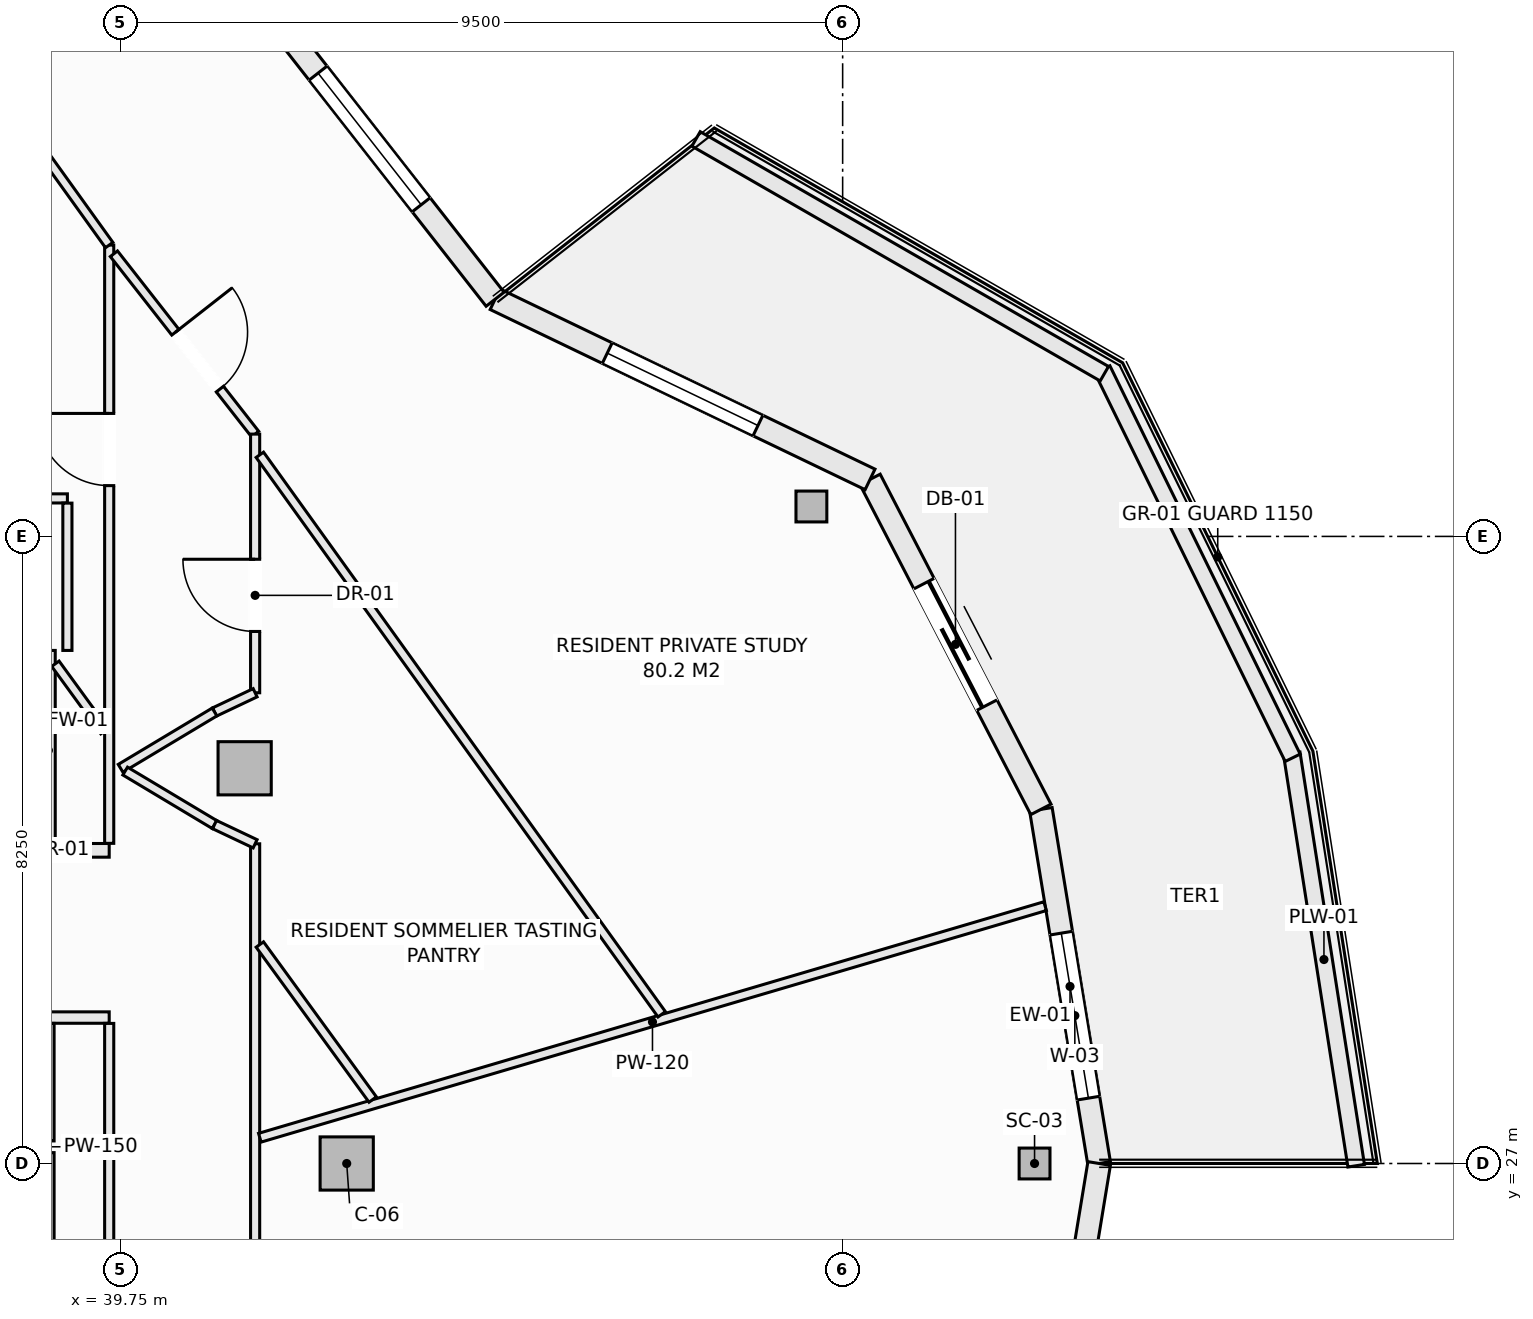
"""IFC4 building model, lengths in metres.
Left out: names, types, materials, properties, quantities, classifications, styles, units other than length and angle.
Written with IfcOpenShell. Run it as: python <this file> out.ifc"""

import sys

from ifc_helpers import new_model, si_unit, direction, frame, frame_2d, origin, origin_2d, place, context, subcontext, project, spatial, rectangle, hollow_rectangle, extrude, element, fill, save


model = new_model("IFC4")
c1 = context("Model", 3, precision=1e-05, world=origin(), true_north=direction((0.0, 1.0)))
c2 = subcontext(c1, "Body", "Model", "MODEL_VIEW")
j1 = project(units=[si_unit("LENGTHUNIT", "METRE"), si_unit("PLANEANGLEUNIT", "RADIAN")], contexts=[c1])
p1 = place(None, origin())
s1 = spatial("IfcSite", under=j1, at=p1, CompositionType="ELEMENT")
p2 = place(p1, origin())
s2 = spatial("IfcBuilding", under=s1, at=p2, CompositionType="ELEMENT")
p3 = place(p2, frame((0.0, 0.0, 242.6)))
s3 = spatial("IfcBuildingStorey", under=s2, at=p3, CompositionType="ELEMENT", Elevation=242.6)
for number, where, z_axis, x_axis in (
    (1, (51.775, 27.0, -0.27), (0.0, 0.0, 1.0), (1.0, 0.0, 0.0)),
    (2, (48.839, 35.644, -0.27), (0.0, 0.0, 1.0), (1.0, 0.0, 0.0)),
):
    element("IfcColumn", number, at=place(p3, frame(where, z_axis=z_axis, x_axis=x_axis)), inside=s3, PredefinedType="COLUMN", context=c2, shape_type="SweptSolid", body=[
        extrude(hollow_rectangle(XDim=0.406, YDim=0.406, WallThickness=0.016, at=origin_2d()), origin(), (0.0, 0.0, 1.0), 3.3),
    ])
for number, where, z_axis, x_axis in (
    (3, (42.725, 27.0, -0.27), (0.0, 0.0, 1.0), (1.0, 0.0, 0.0)),
    (4, (41.382, 32.199, -0.27), (0.0, 0.0, 1.0), (1.0, 0.0, 0.0)),
):
    element("IfcColumn", number, at=place(p3, frame(where, z_axis=z_axis, x_axis=x_axis)), inside=s3, PredefinedType="COLUMN", context=c2, shape_type="SweptSolid", body=[
        extrude(rectangle(XDim=0.7, YDim=0.7, at=origin_2d()), origin(), (0.0, 0.0, 1.0), 3.3),
    ])
p4 = place(p3, frame((51.858, 31.659, 0.0), z_axis=(0.0, 0.0, 1.0), x_axis=(0.162369371657, -0.986730047758, 0.0)))
e5 = element("IfcWall", 5, at=p4, inside=s3, PredefinedType="SOLIDWALL", context=c2, shape_type="SweptSolid", body=[
    extrude(rectangle(XDim=4.721, YDim=0.3, at=frame_2d((2.361, 0.0))), origin(), (0.0, 0.0, 1.0), 2.605),
])
p5 = place(p4, frame((1.65, 0.0, 0.72)))
e6 = element("IfcOpeningElement", 6, at=p5, cuts=e5, PredefinedType="OPENING", context=c2, shape_type="SweptSolid", body=[
    extrude(rectangle(XDim=2.2, YDim=1.65, at=frame_2d((1.1, 0.825))), frame((0.0, 0.16, 0.0), z_axis=(0.0, -1.0, 0.0), x_axis=(1.0, 0.0, 0.0)), (0.0, 0.0, 1.0), 0.32),
])
p6 = place(p3, frame((49.611, 36.0, 0.0), z_axis=(0.0, 0.0, 1.0), x_axis=(0.459793771602, -0.888025724625, 0.0)))
e7 = element("IfcWall", 7, at=p6, inside=s3, PredefinedType="SOLIDWALL", context=c2, shape_type="SweptSolid", body=[
    extrude(rectangle(XDim=4.889, YDim=0.3, at=frame_2d((2.444, 0.0))), origin(), (0.0, 0.0, 1.0), 2.605),
])
p7 = place(p6, frame((1.544, 0.0, 0.0)))
e8 = element("IfcOpeningElement", 8, at=p7, cuts=e7, PredefinedType="OPENING", context=c2, shape_type="SweptSolid", body=[
    extrude(rectangle(XDim=1.8, YDim=2.25, at=frame_2d((0.9, 1.125))), frame((0.0, 0.16, 0.0), z_axis=(0.0, -1.0, 0.0), x_axis=(1.0, 0.0, 0.0)), (0.0, 0.0, 1.0), 0.32),
])
p8 = place(p3, frame((44.677, 38.37, 0.0), z_axis=(0.0, 0.0, 1.0), x_axis=(0.901355238351, -0.433080517106, 0.0)))
e9 = element("IfcWall", 9, at=p8, inside=s3, PredefinedType="SOLIDWALL", context=c2, shape_type="SweptSolid", body=[
    extrude(rectangle(XDim=5.473, YDim=0.3, at=frame_2d((2.737, 0.0))), origin(), (0.0, 0.0, 1.0), 2.605),
])
p9 = place(p8, frame((1.637, 0.0, 0.72)))
e10 = element("IfcOpeningElement", 10, at=p9, cuts=e9, PredefinedType="OPENING", context=c2, shape_type="SweptSolid", body=[
    extrude(rectangle(XDim=2.2, YDim=1.65, at=frame_2d((1.1, 0.825))), frame((0.0, 0.16, 0.0), z_axis=(0.0, -1.0, 0.0), x_axis=(1.0, 0.0, 0.0)), (0.0, 0.0, 1.0), 0.32),
])
p10 = place(p3, frame((41.375, 42.588, 0.0), z_axis=(0.0, 0.0, 1.0), x_axis=(0.61644588519, -0.787397276241, 0.0)))
e11 = element("IfcWall", 11, at=p10, inside=s3, PredefinedType="SOLIDWALL", context=c2, shape_type="SweptSolid", body=[
    extrude(rectangle(XDim=5.357, YDim=0.3, at=frame_2d((2.678, 0.0))), origin(), (0.0, 0.0, 1.0), 2.605),
])
p11 = place(p10, frame((1.579, 0.0, 0.72)))
e12 = element("IfcOpeningElement", 12, at=p11, cuts=e11, PredefinedType="OPENING", context=c2, shape_type="SweptSolid", body=[
    extrude(rectangle(XDim=2.2, YDim=1.65, at=frame_2d((1.1, 0.825))), frame((0.0, 0.16, 0.0), z_axis=(0.0, -1.0, 0.0), x_axis=(1.0, 0.0, 0.0)), (0.0, 0.0, 1.0), 0.32),
])
p12 = place(p3, frame((51.858, 22.341, 0.0), z_axis=(0.0, 0.0, 1.0), x_axis=(0.162369371657, 0.986730047758, 0.0)))
e13 = element("IfcWall", 13, at=p12, inside=s3, PredefinedType="SOLIDWALL", context=c2, shape_type="SweptSolid", body=[
    extrude(rectangle(XDim=4.721, YDim=0.3, at=frame_2d((2.361, 0.0))), origin(), (0.0, 0.0, 1.0), 2.605),
])
p13 = place(p12, frame((1.261, 0.0, 0.72)))
e14 = element("IfcOpeningElement", 14, at=p13, cuts=e13, PredefinedType="OPENING", context=c2, shape_type="SweptSolid", body=[
    extrude(rectangle(XDim=2.2, YDim=1.65, at=frame_2d((1.1, 0.825))), frame((0.0, 0.16, 0.0), z_axis=(0.0, -1.0, 0.0), x_axis=(1.0, 0.0, 0.0)), (0.0, 0.0, 1.0), 0.32),
])
p14 = place(p3, frame((55.158, 32.396, 0.0), z_axis=(0.0, 0.0, 1.0), x_axis=(0.154441975483, -0.988001860428, 0.0)))
e15 = element("IfcWall", 15, at=p14, inside=s3, PredefinedType="PARAPET", context=c2, shape_type="SweptSolid", body=[
    extrude(rectangle(XDim=5.492, YDim=0.22, at=frame_2d((2.746, 0.0))), origin(), (0.0, 0.0, 1.0), 0.52),
])
p15 = place(p3, frame((52.667, 37.447, 0.0), z_axis=(0.0, 0.0, 1.0), x_axis=(0.440058847499, -0.897968936399, 0.0)))
e16 = element("IfcWall", 16, at=p15, inside=s3, PredefinedType="PARAPET", context=c2, shape_type="SweptSolid", body=[
    extrude(rectangle(XDim=5.689, YDim=0.22, at=frame_2d((2.845, 0.0))), origin(), (0.0, 0.0, 1.0), 0.52),
])
p16 = place(p3, frame((47.321, 40.479, 0.0), z_axis=(0.0, 0.0, 1.0), x_axis=(0.866901621005, -0.49847926687, 0.0)))
e17 = element("IfcWall", 17, at=p16, inside=s3, PredefinedType="PARAPET", context=c2, shape_type="SweptSolid", body=[
    extrude(rectangle(XDim=6.197, YDim=0.22, at=frame_2d((3.098, 0.0))), origin(), (0.0, 0.0, 1.0), 0.52),
])
p17 = place(p3, frame((30.077, 28.92, 0.0), z_axis=(0.0, 0.0, 1.0), x_axis=(1.0, 0.0, 0.0)))
e18 = element("IfcWall", 18, at=p17, inside=s3, PredefinedType="PARTITIONING", context=c2, shape_type="SweptSolid", body=[
    extrude(rectangle(XDim=9.523, YDim=0.15, at=frame_2d((4.762, 0.0))), origin(), (0.0, 0.0, 1.0), 3.03),
])
p18 = place(p17, frame((1.342, 0.0, 0.0)))
e19 = element("IfcOpeningElement", 19, at=p18, cuts=e18, PredefinedType="OPENING", context=c2, shape_type="SweptSolid", body=[
    extrude(rectangle(XDim=0.95, YDim=2.1, at=frame_2d((0.475, 1.05))), frame((0.0, 0.085, 0.0), z_axis=(0.0, -1.0, 0.0), x_axis=(1.0, 0.0, 0.0)), (0.0, 0.0, 1.0), 0.17),
])
p19 = place(p17, frame((5.498, 0.0, 0.0)))
e20 = element("IfcOpeningElement", 20, at=p19, cuts=e18, PredefinedType="OPENING", context=c2, shape_type="SweptSolid", body=[
    extrude(rectangle(XDim=0.95, YDim=2.1, at=frame_2d((0.475, 1.05))), frame((0.0, 0.085, 0.0), z_axis=(0.0, -1.0, 0.0), x_axis=(1.0, 0.0, 0.0)), (0.0, 0.0, 1.0), 0.17),
])
p20 = place(p3, frame((38.8, 25.197, 0.0), z_axis=(0.0, 0.0, 1.0), x_axis=(0.0, 1.0, 0.0)))
e21 = element("IfcWall", 21, at=p20, inside=s3, PredefinedType="PARTITIONING", context=c2, shape_type="SweptSolid", body=[
    extrude(rectangle(XDim=1.946, YDim=0.15, at=frame_2d((0.973, 0.0))), origin(), (0.0, 0.0, 1.0), 3.03),
])
p21 = place(p3, frame((38.8, 27.297, 0.0), z_axis=(0.0, 0.0, 1.0), x_axis=(0.0, 1.0, 0.0)))
e22 = element("IfcWall", 22, at=p21, inside=s3, PredefinedType="PARTITIONING", context=c2, shape_type="SweptSolid", body=[
    extrude(rectangle(XDim=1.546, YDim=0.15, at=frame_2d((0.773, 0.0))), origin(), (0.0, 0.0, 1.0), 3.03),
])
p22 = place(p3, frame((38.8, 31.12, 0.0), z_axis=(0.0, 0.0, 1.0), x_axis=(0.0, 1.0, 0.0)))
e23 = element("IfcWall", 23, at=p22, inside=s3, PredefinedType="SOLIDWALL", context=c2, shape_type="SweptSolid", body=[
    extrude(rectangle(XDim=2.63, YDim=0.18, at=frame_2d((1.315, 0.0))), origin(), (0.0, 0.0, 1.0), 3.03),
])
p23 = place(p3, frame((38.892, 31.12, 0.0), z_axis=(0.0, 0.0, 1.0), x_axis=(1.0, 0.0, 0.0)))
e24 = element("IfcWall", 24, at=p23, inside=s3, PredefinedType="SOLIDWALL", context=c2, shape_type="SweptSolid", body=[
    extrude(rectangle(XDim=0.708, YDim=0.18, at=frame_2d((0.354, 0.0))), origin(), (0.0, 0.0, 1.0), 3.03),
])
p24 = place(p3, frame((33.913, 35.75, 0.0), z_axis=(0.0, 0.0, 1.0), x_axis=(1.0, 0.0, 0.0)))
e25 = element("IfcWall", 25, at=p24, inside=s3, PredefinedType="PARTITIONING", context=c2, shape_type="SweptSolid", body=[
    extrude(rectangle(XDim=5.137, YDim=0.12, at=frame_2d((2.568, 0.0))), origin(), (0.0, 0.0, 1.0), 2.478),
])
p25 = place(p3, frame((39.05, 33.75, 0.0), z_axis=(0.0, 0.0, 1.0), x_axis=(0.0, 1.0, 0.0)))
e26 = element("IfcWall", 26, at=p25, inside=s3, PredefinedType="PARTITIONING", context=c2, shape_type="SweptSolid", body=[
    extrude(rectangle(XDim=1.938, YDim=0.12, at=frame_2d((0.969, 0.0))), origin(), (0.0, 0.0, 1.0), 3.03),
])
p26 = place(p3, frame((39.6, 25.197, 0.0), z_axis=(0.0, 0.0, 1.0), x_axis=(0.0, 1.0, 0.0)))
e27 = element("IfcWall", 27, at=p26, inside=s3, PredefinedType="PARTITIONING", context=c2, shape_type="SweptSolid", body=[
    extrude(rectangle(XDim=3.646, YDim=0.12, at=frame_2d((1.823, 0.0))), origin(), (0.0, 0.0, 1.0), 3.03),
])
p27 = place(p3, frame((39.6, 31.212, 0.0), z_axis=(0.0, 0.0, 1.0), x_axis=(0.0, 1.0, 0.0)))
e28 = element("IfcWall", 28, at=p27, inside=s3, PredefinedType="PARTITIONING", context=c2, shape_type="SweptSolid", body=[
    extrude(rectangle(XDim=7.871, YDim=0.12, at=frame_2d((3.936, 0.0))), origin(), (0.0, 0.0, 1.0), 3.03),
])
p28 = place(p27, frame((4.706, 0.0, 0.0)))
e29 = element("IfcOpeningElement", 29, at=p28, cuts=e28, PredefinedType="OPENING", context=c2, shape_type="SweptSolid", body=[
    extrude(rectangle(XDim=0.95, YDim=2.1, at=frame_2d((0.475, 1.05))), frame((0.0, 0.07, 0.0), z_axis=(0.0, -1.0, 0.0), x_axis=(1.0, 0.0, 0.0)), (0.0, 0.0, 1.0), 0.14),
])
p29 = place(p3, frame((39.662, 38.969, 0.0), z_axis=(0.0, 0.0, 1.0), x_axis=(0.616500468458, -0.787354540465, 0.0)))
e30 = element("IfcWall", 30, at=p29, inside=s3, PredefinedType="PARTITIONING", context=c2, shape_type="SweptSolid", body=[
    extrude(rectangle(XDim=3.014, YDim=0.12, at=frame_2d((1.507, 0.0))), origin(), (0.0, 0.0, 1.0), 3.03),
])
p30 = place(p29, frame((1.312, 0.0, 0.0)))
e31 = element("IfcOpeningElement", 31, at=p30, cuts=e30, PredefinedType="OPENING", context=c2, shape_type="SweptSolid", body=[
    extrude(rectangle(XDim=0.95, YDim=2.1, at=frame_2d((0.475, 1.05))), frame((0.0, 0.07, 0.0), z_axis=(0.0, -1.0, 0.0), x_axis=(1.0, 0.0, 0.0)), (0.0, 0.0, 1.0), 0.14),
])
p31 = place(p3, frame((41.52, 22.794, 0.0), z_axis=(0.0, 0.0, 1.0), x_axis=(0.0, 1.0, 0.0)))
e32 = element("IfcWall", 32, at=p31, inside=s3, PredefinedType="PARTITIONING", context=c2, shape_type="SweptSolid", body=[
    extrude(rectangle(XDim=8.412, YDim=0.12, at=frame_2d((4.206, 0.0))), origin(), (0.0, 0.0, 1.0), 2.478),
])
p32 = place(p31, frame((1.999, 0.0, 0.0)))
e33 = element("IfcOpeningElement", 33, at=p32, cuts=e32, PredefinedType="OPENING", context=c2, shape_type="SweptSolid", body=[
    extrude(rectangle(XDim=0.95, YDim=2.1, at=frame_2d((0.475, 1.05))), frame((0.0, 0.07, 0.0), z_axis=(0.0, -1.0, 0.0), x_axis=(1.0, 0.0, 0.0)), (0.0, 0.0, 1.0), 0.14),
])
p33 = place(p3, frame((41.52, 33.193, 0.0), z_axis=(0.0, 0.0, 1.0), x_axis=(0.0, 1.0, 0.0)))
e34 = element("IfcWall", 34, at=p33, inside=s3, PredefinedType="PARTITIONING", context=c2, shape_type="SweptSolid", body=[
    extrude(rectangle(XDim=3.403, YDim=0.12, at=frame_2d((1.701, 0.0))), origin(), (0.0, 0.0, 1.0), 3.03),
])
p34 = place(p33, frame((0.806, 0.0, 0.0)))
e35 = element("IfcOpeningElement", 35, at=p34, cuts=e34, PredefinedType="OPENING", context=c2, shape_type="SweptSolid", body=[
    extrude(rectangle(XDim=0.95, YDim=2.1, at=frame_2d((0.475, 1.05))), frame((0.0, 0.07, 0.0), z_axis=(0.0, -1.0, 0.0), x_axis=(1.0, 0.0, 0.0)), (0.0, 0.0, 1.0), 0.14),
])
p35 = place(p3, frame((40.986, 32.94, 0.0), z_axis=(0.0, 0.0, 1.0), x_axis=(0.90356951601, 0.428441512621, 0.0)))
e36 = element("IfcWall", 36, at=p35, inside=s3, PredefinedType="PARTITIONING", context=c2, shape_type="SweptSolid", body=[
    extrude(rectangle(XDim=0.591, YDim=0.12, at=frame_2d((0.295, 0.0))), origin(), (0.0, 0.0, 1.0), 3.03),
])
p36 = place(p3, frame((39.75, 32.199, 0.0), z_axis=(0.0, 0.0, 1.0), x_axis=(0.857702120906, 0.514146935996, 0.0)))
e37 = element("IfcWall", 37, at=p36, inside=s3, PredefinedType="PARTITIONING", context=c2, shape_type="SweptSolid", body=[
    extrude(rectangle(XDim=1.441, YDim=0.12, at=frame_2d((0.721, 0.0))), origin(), (0.0, 0.0, 1.0), 3.03),
])
p37 = place(p3, frame((39.81, 32.163, 0.0), z_axis=(0.0, 0.0, 1.0), x_axis=(0.858011245414, -0.513630901273, 0.0)))
e38 = element("IfcWall", 38, at=p37, inside=s3, PredefinedType="PARTITIONING", context=c2, shape_type="SweptSolid", body=[
    extrude(rectangle(XDim=1.37, YDim=0.12, at=frame_2d((0.685, 0.0))), origin(), (0.0, 0.0, 1.0), 3.03),
])
p38 = place(p3, frame((40.986, 31.459, 0.0), z_axis=(0.0, 0.0, 1.0), x_axis=(0.903729424576, -0.428104107847, 0.0)))
e39 = element("IfcWall", 39, at=p38, inside=s3, PredefinedType="PARTITIONING", context=c2, shape_type="SweptSolid", body=[
    extrude(rectangle(XDim=0.591, YDim=0.12, at=frame_2d((0.295, 0.0))), origin(), (0.0, 0.0, 1.0), 3.03),
])
p39 = place(p3, frame((41.582, 27.339, 0.0), z_axis=(0.0, 0.0, 1.0), x_axis=(0.959173635638, 0.282817850741, 0.0)))
e40 = element("IfcWall", 40, at=p39, inside=s3, PredefinedType="PARTITIONING", context=c2, shape_type="SweptSolid", body=[
    extrude(rectangle(XDim=10.771, YDim=0.12, at=frame_2d((5.386, 0.0))), origin(), (0.0, 0.0, 1.0), 3.03),
])
p40 = place(p3, frame((38.892, 33.575, 0.0), z_axis=(0.0, 0.0, 1.0), x_axis=(0.5886213307, -0.808408887287, 0.0)))
e41 = element("IfcWall", 41, at=p40, inside=s3, PredefinedType="PARTITIONING", context=c2, shape_type="SweptSolid", body=[
    extrude(rectangle(XDim=1.097, YDim=0.12, at=frame_2d((0.549, 0.0))), origin(), (0.0, 0.0, 1.0), 3.03),
])
p41 = place(p3, frame((41.582, 29.881, 0.0), z_axis=(0.0, 0.0, 1.0), x_axis=(0.588620460465, -0.808409520925, 0.0)))
e42 = element("IfcWall", 42, at=p41, inside=s3, PredefinedType="PARTITIONING", context=c2, shape_type="SweptSolid", body=[
    extrude(rectangle(XDim=2.523, YDim=0.12, at=frame_2d((1.261, 0.0))), origin(), (0.0, 0.0, 1.0), 2.478),
])
p42 = place(p3, frame((35.896, 44.24, 0.0), z_axis=(0.0, 0.0, 1.0), x_axis=(0.583414962814, -0.812174230793, 0.0)))
e43 = element("IfcWall", 43, at=p42, inside=s3, PredefinedType="PARTITIONING", context=c2, shape_type="SweptSolid", body=[
    extrude(rectangle(XDim=6.349, YDim=0.12, at=frame_2d((3.175, 0.0))), origin(), (0.0, 0.0, 1.0), 3.03),
])
p43 = place(p3, frame((41.582, 36.324, 0.0), z_axis=(0.0, 0.0, 1.0), x_axis=(0.583386800507, -0.812194460086, 0.0)))
e44 = element("IfcWall", 44, at=p43, inside=s3, PredefinedType="PARTITIONING", context=c2, shape_type="SweptSolid", body=[
    extrude(rectangle(XDim=9.063, YDim=0.12, at=frame_2d((4.532, 0.0))), origin(), (0.0, 0.0, 1.0), 3.03),
])
p44 = place(p5, origin())
e45 = element("IfcWindow", 45, at=p44, inside=s3, PartitioningType="SINGLE_PANEL", PredefinedType="WINDOW", context=c2, shape_type="SweptSolid", body=[
    extrude(rectangle(XDim=2.2, YDim=1.65, at=frame_2d((1.1, 0.825))), frame((0.0, 0.03, 0.0), z_axis=(0.0, -1.0, 0.0), x_axis=(1.0, 0.0, 0.0)), (0.0, 0.0, 1.0), 0.06),
])
fill(e6, e45)
p45 = place(p7, origin())
e46 = element("IfcDoor", 46, at=p45, inside=s3, OperationType="SLIDING_TO_LEFT", PredefinedType="DOOR", context=c2, shape_type="SweptSolid", body=[
    extrude(rectangle(XDim=1.8, YDim=2.25, at=frame_2d((0.9, 1.125))), frame((0.0, 0.025, 0.0), z_axis=(0.0, -1.0, 0.0), x_axis=(1.0, 0.0, 0.0)), (0.0, 0.0, 1.0), 0.05),
])
fill(e8, e46)
p46 = place(p9, origin())
e47 = element("IfcWindow", 47, at=p46, inside=s3, PartitioningType="SINGLE_PANEL", PredefinedType="WINDOW", context=c2, shape_type="SweptSolid", body=[
    extrude(rectangle(XDim=2.2, YDim=1.65, at=frame_2d((1.1, 0.825))), frame((0.0, 0.03, 0.0), z_axis=(0.0, -1.0, 0.0), x_axis=(1.0, 0.0, 0.0)), (0.0, 0.0, 1.0), 0.06),
])
fill(e10, e47)
p47 = place(p11, origin())
e48 = element("IfcWindow", 48, at=p47, inside=s3, PartitioningType="SINGLE_PANEL", PredefinedType="WINDOW", context=c2, shape_type="SweptSolid", body=[
    extrude(rectangle(XDim=2.2, YDim=1.65, at=frame_2d((1.1, 0.825))), frame((0.0, 0.03, 0.0), z_axis=(0.0, -1.0, 0.0), x_axis=(1.0, 0.0, 0.0)), (0.0, 0.0, 1.0), 0.06),
])
fill(e12, e48)
p48 = place(p34, origin())
e49 = element("IfcDoor", 49, at=p48, inside=s3, OperationType="SINGLE_SWING_RIGHT", PredefinedType="DOOR", context=c2, shape_type="SweptSolid", body=[
    extrude(rectangle(XDim=0.95, YDim=2.1, at=frame_2d((0.475, 1.05))), frame((0.0, 0.025, 0.0), z_axis=(0.0, -1.0, 0.0), x_axis=(1.0, 0.0, 0.0)), (0.0, 0.0, 1.0), 0.05),
])
fill(e35, e49)
p49 = place(p30, origin())
e50 = element("IfcDoor", 50, at=p49, inside=s3, OperationType="SINGLE_SWING_LEFT", PredefinedType="DOOR", context=c2, shape_type="SweptSolid", body=[
    extrude(rectangle(XDim=0.95, YDim=2.1, at=frame_2d((0.475, 1.05))), frame((0.0, 0.025, 0.0), z_axis=(0.0, -1.0, 0.0), x_axis=(1.0, 0.0, 0.0)), (0.0, 0.0, 1.0), 0.05),
])
fill(e31, e50)
p50 = place(p28, origin())
e51 = element("IfcDoor", 51, at=p50, inside=s3, OperationType="SINGLE_SWING_RIGHT", PredefinedType="DOOR", context=c2, shape_type="SweptSolid", body=[
    extrude(rectangle(XDim=0.95, YDim=2.1, at=frame_2d((0.475, 1.05))), frame((0.0, 0.025, 0.0), z_axis=(0.0, -1.0, 0.0), x_axis=(1.0, 0.0, 0.0)), (0.0, 0.0, 1.0), 0.05),
])
fill(e29, e51)
save(model, sys.argv[1])
